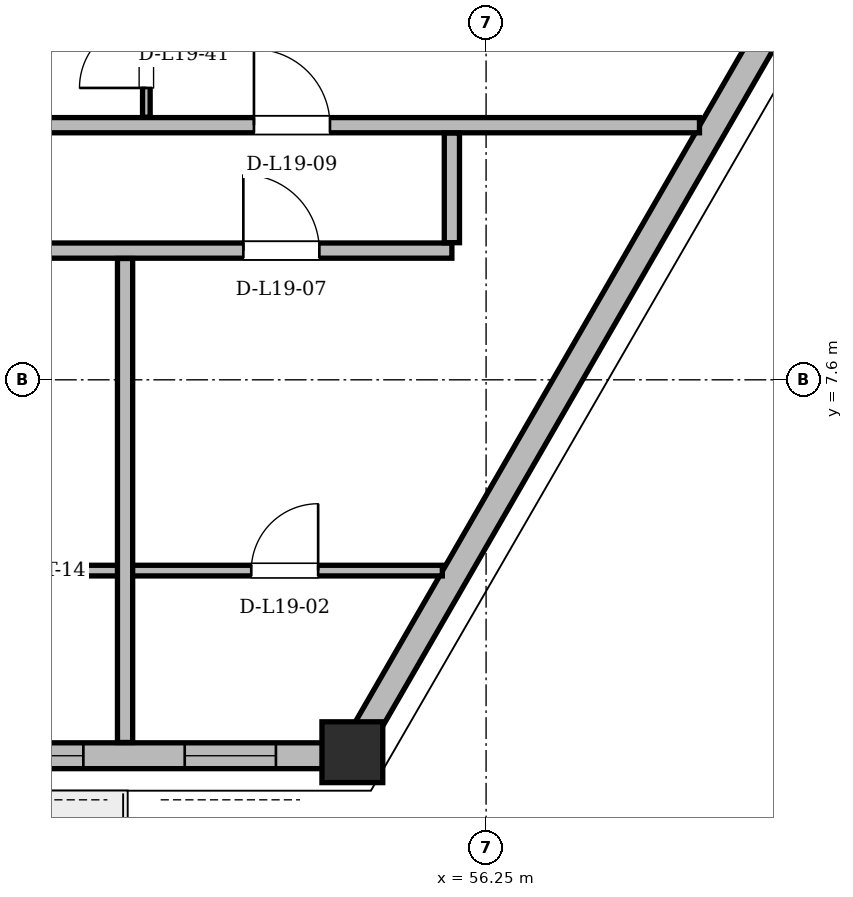
"""IFC4 building model, lengths in metres.
Left out: names, types, materials, properties, quantities, classifications, styles, units other than length and angle.
Written with IfcOpenShell. Run it as: python <this file> out.ifc"""

import sys

from ifc_helpers import new_model, si_unit, direction, frame, frame_2d, origin, origin_2d, place, context, subcontext, project, spatial, rectangle, hollow_rectangle, extrude, element, fill, save


model = new_model("IFC4")
c1 = context("Model", 3, precision=1e-05, world=origin(), true_north=direction((0.0, 1.0)))
c2 = subcontext(c1, "Body", "Model", "MODEL_VIEW")
j1 = project(units=[si_unit("LENGTHUNIT", "METRE"), si_unit("PLANEANGLEUNIT", "RADIAN")], contexts=[c1])
p1 = place(None, origin())
s1 = spatial("IfcSite", under=j1, at=p1, CompositionType="ELEMENT")
p2 = place(p1, origin())
s2 = spatial("IfcBuilding", under=s1, at=p2, CompositionType="ELEMENT")
p3 = place(p2, frame((0.0, 0.0, 74.1)))
s3 = spatial("IfcBuildingStorey", under=s2, at=p3, CompositionType="ELEMENT", Elevation=74.1)
p4 = place(p3, frame((54.469, 2.654, 0.004), z_axis=(0.011960595678, 0.025891971327, 0.99959319224), x_axis=(-0.907819857373, 0.419360354062, 0.0)))
e1 = element("IfcColumn", 1, at=p4, inside=s3, PredefinedType="COLUMN", context=c2, shape_type="SweptSolid", body=[
    extrude(hollow_rectangle(XDim=0.8, YDim=0.8, WallThickness=0.065, at=origin_2d()), origin(), (0.0, 0.0, 1.0), 3.593),
])
p5 = place(p3, frame((20.531, 2.654, 0.0), z_axis=(0.0, 0.0, 1.0), x_axis=(1.0, 0.0, 0.0)))
e2 = element("IfcWall", 2, at=p5, inside=s3, PredefinedType="SOLIDWALL", context=c2, shape_type="SweptSolid", body=[
    extrude(rectangle(XDim=33.938, YDim=0.34, at=frame_2d((16.969, 0.0))), origin(), (0.0, 0.0, 1.0), 2.474),
])
p6 = place(p5, frame((7.824, 0.0, 0.0)))
e3 = element("IfcOpeningElement", 3, at=p6, cuts=e2, PredefinedType="OPENING", context=c2, shape_type="SweptSolid", body=[
    extrude(rectangle(XDim=1.5, YDim=2.2, at=frame_2d((0.75, 1.1))), frame((0.0, 0.17, 0.0), z_axis=(0.0, -1.0, 0.0), x_axis=(1.0, 0.0, 0.0)), (0.0, 0.0, 1.0), 0.34),
])
p7 = place(p5, frame((26.279, 0.0, 0.0)))
e4 = element("IfcOpeningElement", 4, at=p7, cuts=e2, PredefinedType="OPENING", context=c2, shape_type="SweptSolid", body=[
    extrude(rectangle(XDim=1.5, YDim=2.2, at=frame_2d((0.75, 1.1))), frame((0.0, 0.17, 0.0), z_axis=(0.0, -1.0, 0.0), x_axis=(1.0, 0.0, 0.0)), (0.0, 0.0, 1.0), 0.34),
])
p8 = place(p5, frame((1.161, 0.0, 0.85)))
e5 = element("IfcOpeningElement", 5, at=p8, cuts=e2, PredefinedType="OPENING", context=c2, shape_type="SweptSolid", body=[
    extrude(rectangle(XDim=2.0, YDim=1.514, at=frame_2d((1.0, 0.757))), frame((0.0, 0.17, 0.0), z_axis=(0.0, -1.0, 0.0), x_axis=(1.0, 0.0, 0.0)), (0.0, 0.0, 1.0), 0.34),
])
p9 = place(p5, frame((10.908, 0.0, 0.85)))
e6 = element("IfcOpeningElement", 6, at=p9, cuts=e2, PredefinedType="OPENING", context=c2, shape_type="SweptSolid", body=[
    extrude(rectangle(XDim=1.2, YDim=1.474, at=frame_2d((0.6, 0.737))), frame((0.0, 0.17, 0.0), z_axis=(0.0, -1.0, 0.0), x_axis=(1.0, 0.0, 0.0)), (0.0, 0.0, 1.0), 0.34),
])
p10 = place(p5, frame((15.927, 0.0, 0.85)))
e7 = element("IfcOpeningElement", 7, at=p10, cuts=e2, PredefinedType="OPENING", context=c2, shape_type="SweptSolid", body=[
    extrude(rectangle(XDim=1.2, YDim=1.474, at=frame_2d((0.6, 0.737))), frame((0.0, 0.17, 0.0), z_axis=(0.0, -1.0, 0.0), x_axis=(1.0, 0.0, 0.0)), (0.0, 0.0, 1.0), 0.34),
])
p11 = place(p5, frame((18.531, 0.0, 0.85)))
e8 = element("IfcOpeningElement", 8, at=p11, cuts=e2, PredefinedType="OPENING", context=c2, shape_type="SweptSolid", body=[
    extrude(rectangle(XDim=1.2, YDim=1.474, at=frame_2d((0.6, 0.737))), frame((0.0, 0.17, 0.0), z_axis=(0.0, -1.0, 0.0), x_axis=(1.0, 0.0, 0.0)), (0.0, 0.0, 1.0), 0.34),
])
p12 = place(p5, frame((24.388, 0.0, 0.85)))
e9 = element("IfcOpeningElement", 9, at=p12, cuts=e2, PredefinedType="OPENING", context=c2, shape_type="SweptSolid", body=[
    extrude(rectangle(XDim=1.2, YDim=1.474, at=frame_2d((0.6, 0.737))), frame((0.0, 0.17, 0.0), z_axis=(0.0, -1.0, 0.0), x_axis=(1.0, 0.0, 0.0)), (0.0, 0.0, 1.0), 0.34),
])
p13 = place(p5, frame((29.22, 0.0, 0.85)))
e10 = element("IfcOpeningElement", 10, at=p13, cuts=e2, PredefinedType="OPENING", context=c2, shape_type="SweptSolid", body=[
    extrude(rectangle(XDim=1.2, YDim=1.474, at=frame_2d((0.6, 0.737))), frame((0.0, 0.17, 0.0), z_axis=(0.0, -1.0, 0.0), x_axis=(1.0, 0.0, 0.0)), (0.0, 0.0, 1.0), 0.34),
])
p14 = place(p5, frame((31.754, 0.0, 0.85)))
e11 = element("IfcOpeningElement", 11, at=p14, cuts=e2, PredefinedType="OPENING", context=c2, shape_type="SweptSolid", body=[
    extrude(rectangle(XDim=1.2, YDim=1.474, at=frame_2d((0.6, 0.737))), frame((0.0, 0.17, 0.0), z_axis=(0.0, -1.0, 0.0), x_axis=(1.0, 0.0, 0.0)), (0.0, 0.0, 1.0), 0.34),
])
p15 = place(p3, frame((54.469, 2.654, 0.0), z_axis=(0.0, 0.0, 1.0), x_axis=(0.499994178302, 0.866028764917, 0.0)))
e12 = element("IfcWall", 12, at=p15, inside=s3, PredefinedType="SOLIDWALL", context=c2, shape_type="SweptSolid", body=[
    extrude(rectangle(XDim=13.248, YDim=0.34, at=frame_2d((6.624, 0.0))), origin(), (0.0, 0.0, 1.0), 2.474),
])
p16 = place(p3, frame((43.718, 5.09, 0.0), z_axis=(0.0, 0.0, 1.0), x_axis=(1.0, 0.0, 0.0)))
e13 = element("IfcWall", 13, at=p16, inside=s3, PredefinedType="PARTITIONING", context=c2, shape_type="SweptSolid", body=[
    extrude(rectangle(XDim=11.956, YDim=0.14, at=frame_2d((5.978, 0.0))), origin(), (0.0, 0.0, 1.0), 2.718),
])
p17 = place(p16, frame((3.492, 0.0, 0.0)))
e14 = element("IfcOpeningElement", 14, at=p17, cuts=e13, PredefinedType="OPENING", context=c2, shape_type="SweptSolid", body=[
    extrude(rectangle(XDim=0.88, YDim=2.08, at=frame_2d((0.44, 1.04))), frame((0.0, 0.07, 0.0), z_axis=(0.0, -1.0, 0.0), x_axis=(1.0, 0.0, 0.0)), (0.0, 0.0, 1.0), 0.14),
])
p18 = place(p16, frame((9.442, 0.0, 0.0)))
e15 = element("IfcOpeningElement", 15, at=p18, cuts=e13, PredefinedType="OPENING", context=c2, shape_type="SweptSolid", body=[
    extrude(rectangle(XDim=0.88, YDim=2.08, at=frame_2d((0.44, 1.04))), frame((0.0, 0.07, 0.0), z_axis=(0.0, -1.0, 0.0), x_axis=(1.0, 0.0, 0.0)), (0.0, 0.0, 1.0), 0.14),
])
p19 = place(p3, frame((19.2, 9.3, 0.0), z_axis=(0.0, 0.0, 1.0), x_axis=(1.0, 0.0, 0.0)))
e16 = element("IfcWall", 16, at=p19, inside=s3, PredefinedType="PARTITIONING", context=c2, shape_type="SweptSolid", body=[
    extrude(rectangle(XDim=36.6, YDim=0.2, at=frame_2d((18.3, 0.0))), origin(), (0.0, 0.0, 1.0), 2.718),
])
p20 = place(p19, frame((1.634, 0.0, 0.0)))
e17 = element("IfcOpeningElement", 17, at=p20, cuts=e16, PredefinedType="OPENING", context=c2, shape_type="SweptSolid", body=[
    extrude(rectangle(XDim=1.0, YDim=2.18, at=frame_2d((0.5, 1.09))), frame((0.0, 0.1, 0.0), z_axis=(0.0, -1.0, 0.0), x_axis=(1.0, 0.0, 0.0)), (0.0, 0.0, 1.0), 0.2),
])
p21 = place(p19, frame((10.733, 0.0, 0.0)))
e18 = element("IfcOpeningElement", 18, at=p21, cuts=e16, PredefinedType="OPENING", context=c2, shape_type="SweptSolid", body=[
    extrude(rectangle(XDim=1.0, YDim=2.18, at=frame_2d((0.5, 1.09))), frame((0.0, 0.1, 0.0), z_axis=(0.0, -1.0, 0.0), x_axis=(1.0, 0.0, 0.0)), (0.0, 0.0, 1.0), 0.2),
])
p22 = place(p19, frame((19.314, 0.0, 0.0)))
e19 = element("IfcOpeningElement", 19, at=p22, cuts=e16, PredefinedType="OPENING", context=c2, shape_type="SweptSolid", body=[
    extrude(rectangle(XDim=1.0, YDim=2.18, at=frame_2d((0.5, 1.09))), frame((0.0, 0.1, 0.0), z_axis=(0.0, -1.0, 0.0), x_axis=(1.0, 0.0, 0.0)), (0.0, 0.0, 1.0), 0.2),
])
p23 = place(p19, frame((28.985, 0.0, 0.0)))
e20 = element("IfcOpeningElement", 20, at=p23, cuts=e16, PredefinedType="OPENING", context=c2, shape_type="SweptSolid", body=[
    extrude(rectangle(XDim=1.0, YDim=2.18, at=frame_2d((0.5, 1.09))), frame((0.0, 0.1, 0.0), z_axis=(0.0, -1.0, 0.0), x_axis=(1.0, 0.0, 0.0)), (0.0, 0.0, 1.0), 0.2),
])
p24 = place(p19, frame((33.856, 0.0, 0.0)))
e21 = element("IfcOpeningElement", 21, at=p24, cuts=e16, PredefinedType="OPENING", context=c2, shape_type="SweptSolid", body=[
    extrude(rectangle(XDim=1.0, YDim=2.18, at=frame_2d((0.5, 1.09))), frame((0.0, 0.1, 0.0), z_axis=(0.0, -1.0, 0.0), x_axis=(1.0, 0.0, 0.0)), (0.0, 0.0, 1.0), 0.2),
])
p25 = place(p3, frame((47.45, 10.95, 0.0), z_axis=(0.0, 0.0, 1.0), x_axis=(1.0, 0.0, 0.0)))
e22 = element("IfcWall", 22, at=p25, inside=s3, PredefinedType="PARTITIONING", context=c2, shape_type="SweptSolid", body=[
    extrude(rectangle(XDim=11.608, YDim=0.2, at=frame_2d((5.804, 0.0))), origin(), (0.0, 0.0, 1.0), 3.34),
])
p26 = place(p25, frame((5.746, 0.0, 0.0)))
e23 = element("IfcOpeningElement", 23, at=p26, cuts=e22, PredefinedType="OPENING", context=c2, shape_type="SweptSolid", body=[
    extrude(rectangle(XDim=1.0, YDim=2.18, at=frame_2d((0.5, 1.09))), frame((0.0, 0.1, 0.0), z_axis=(0.0, -1.0, 0.0), x_axis=(1.0, 0.0, 0.0)), (0.0, 0.0, 1.0), 0.2),
])
p27 = place(p3, frame((51.5, 2.828, 0.0), z_axis=(0.0, 0.0, 1.0), x_axis=(0.0, 1.0, 0.0)))
e24 = element("IfcWall", 24, at=p27, inside=s3, PredefinedType="PARTITIONING", context=c2, shape_type="SweptSolid", body=[
    extrude(rectangle(XDim=6.368, YDim=0.2, at=frame_2d((3.184, 0.0))), origin(), (0.0, 0.0, 1.0), 2.718),
])
p28 = place(p3, frame((51.78, 11.054, 0.0), z_axis=(0.0, 0.0, 1.0), x_axis=(0.0, 1.0, 0.0)))
e25 = element("IfcWall", 25, at=p28, inside=s3, PredefinedType="PARTITIONING", context=c2, shape_type="SweptSolid", body=[
    extrude(rectangle(XDim=13.162, YDim=0.1, at=frame_2d((6.581, 0.0))), origin(), (0.0, 0.0, 1.0), 2.718),
])
p29 = place(p28, frame((0.386, 0.0, 0.0)))
e26 = element("IfcOpeningElement", 26, at=p29, cuts=e25, PredefinedType="OPENING", context=c2, shape_type="SweptSolid", body=[
    extrude(rectangle(XDim=0.88, YDim=2.08, at=frame_2d((0.44, 1.04))), frame((0.0, 0.05, 0.0), z_axis=(0.0, -1.0, 0.0), x_axis=(1.0, 0.0, 0.0)), (0.0, 0.0, 1.0), 0.1),
])
p30 = place(p28, frame((2.368, 0.0, 0.0)))
e27 = element("IfcOpeningElement", 27, at=p30, cuts=e25, PredefinedType="OPENING", context=c2, shape_type="SweptSolid", body=[
    extrude(rectangle(XDim=0.95, YDim=2.1, at=frame_2d((0.475, 1.05))), frame((0.0, 0.05, 0.0), z_axis=(0.0, -1.0, 0.0), x_axis=(1.0, 0.0, 0.0)), (0.0, 0.0, 1.0), 0.1),
])
p31 = place(p28, frame((8.138, 0.0, 0.0)))
e28 = element("IfcOpeningElement", 28, at=p31, cuts=e25, PredefinedType="OPENING", context=c2, shape_type="SweptSolid", body=[
    extrude(rectangle(XDim=0.92, YDim=2.12, at=frame_2d((0.46, 1.06))), frame((0.0, 0.05, 0.0), z_axis=(0.0, -1.0, 0.0), x_axis=(1.0, 0.0, 0.0)), (0.0, 0.0, 1.0), 0.1),
])
p32 = place(p3, frame((55.8, 9.404, 0.0), z_axis=(0.0, 0.0, 1.0), x_axis=(0.0, 1.0, 0.0)))
e29 = element("IfcWall", 29, at=p32, inside=s3, PredefinedType="PARTITIONING", context=c2, shape_type="SweptSolid", body=[
    extrude(rectangle(XDim=1.442, YDim=0.2, at=frame_2d((0.721, 0.0))), origin(), (0.0, 0.0, 1.0), 3.34),
])
p33 = place(p13, origin())
e30 = element("IfcWindow", 30, at=p33, inside=s3, PartitioningType="SINGLE_PANEL", PredefinedType="WINDOW", context=c2, shape_type="SweptSolid", body=[
    extrude(rectangle(XDim=1.2, YDim=1.474, at=frame_2d((0.6, 0.737))), frame((0.0, 0.03, 0.0), z_axis=(0.0, -1.0, 0.0), x_axis=(1.0, 0.0, 0.0)), (0.0, 0.0, 1.0), 0.06),
])
fill(e10, e30)
p34 = place(p14, origin())
e31 = element("IfcWindow", 31, at=p34, inside=s3, PartitioningType="SINGLE_PANEL", PredefinedType="WINDOW", context=c2, shape_type="SweptSolid", body=[
    extrude(rectangle(XDim=1.2, YDim=1.474, at=frame_2d((0.6, 0.737))), frame((0.0, 0.03, 0.0), z_axis=(0.0, -1.0, 0.0), x_axis=(1.0, 0.0, 0.0)), (0.0, 0.0, 1.0), 0.06),
])
fill(e11, e31)
p35 = place(p18, origin())
e32 = element("IfcDoor", 32, at=p35, inside=s3, OperationType="SINGLE_SWING_RIGHT", PredefinedType="DOOR", context=c2, shape_type="SweptSolid", body=[
    extrude(rectangle(XDim=0.88, YDim=2.08, at=frame_2d((0.44, 1.04))), frame((0.0, 0.025, 0.0), z_axis=(0.0, -1.0, 0.0), x_axis=(1.0, 0.0, 0.0)), (0.0, 0.0, 1.0), 0.05),
])
fill(e15, e32)
p36 = place(p24, origin())
e33 = element("IfcDoor", 33, at=p36, inside=s3, OperationType="SINGLE_SWING_LEFT", PredefinedType="DOOR", context=c2, shape_type="SweptSolid", body=[
    extrude(rectangle(XDim=1.0, YDim=2.18, at=frame_2d((0.5, 1.09))), frame((0.0, 0.025, 0.0), z_axis=(0.0, -1.0, 0.0), x_axis=(1.0, 0.0, 0.0)), (0.0, 0.0, 1.0), 0.05),
])
fill(e21, e33)
p37 = place(p26, origin())
e34 = element("IfcDoor", 34, at=p37, inside=s3, OperationType="SINGLE_SWING_LEFT", PredefinedType="DOOR", context=c2, shape_type="SweptSolid", body=[
    extrude(rectangle(XDim=1.0, YDim=2.18, at=frame_2d((0.5, 1.09))), frame((0.0, 0.025, 0.0), z_axis=(0.0, -1.0, 0.0), x_axis=(1.0, 0.0, 0.0)), (0.0, 0.0, 1.0), 0.05),
])
fill(e23, e34)
p38 = place(p29, origin())
e35 = element("IfcDoor", 35, at=p38, inside=s3, OperationType="SINGLE_SWING_LEFT", PredefinedType="DOOR", context=c2, shape_type="SweptSolid", body=[
    extrude(rectangle(XDim=0.88, YDim=2.08, at=frame_2d((0.44, 1.04))), frame((0.0, 0.025, 0.0), z_axis=(0.0, -1.0, 0.0), x_axis=(1.0, 0.0, 0.0)), (0.0, 0.0, 1.0), 0.05),
])
fill(e26, e35)
save(model, sys.argv[1])
